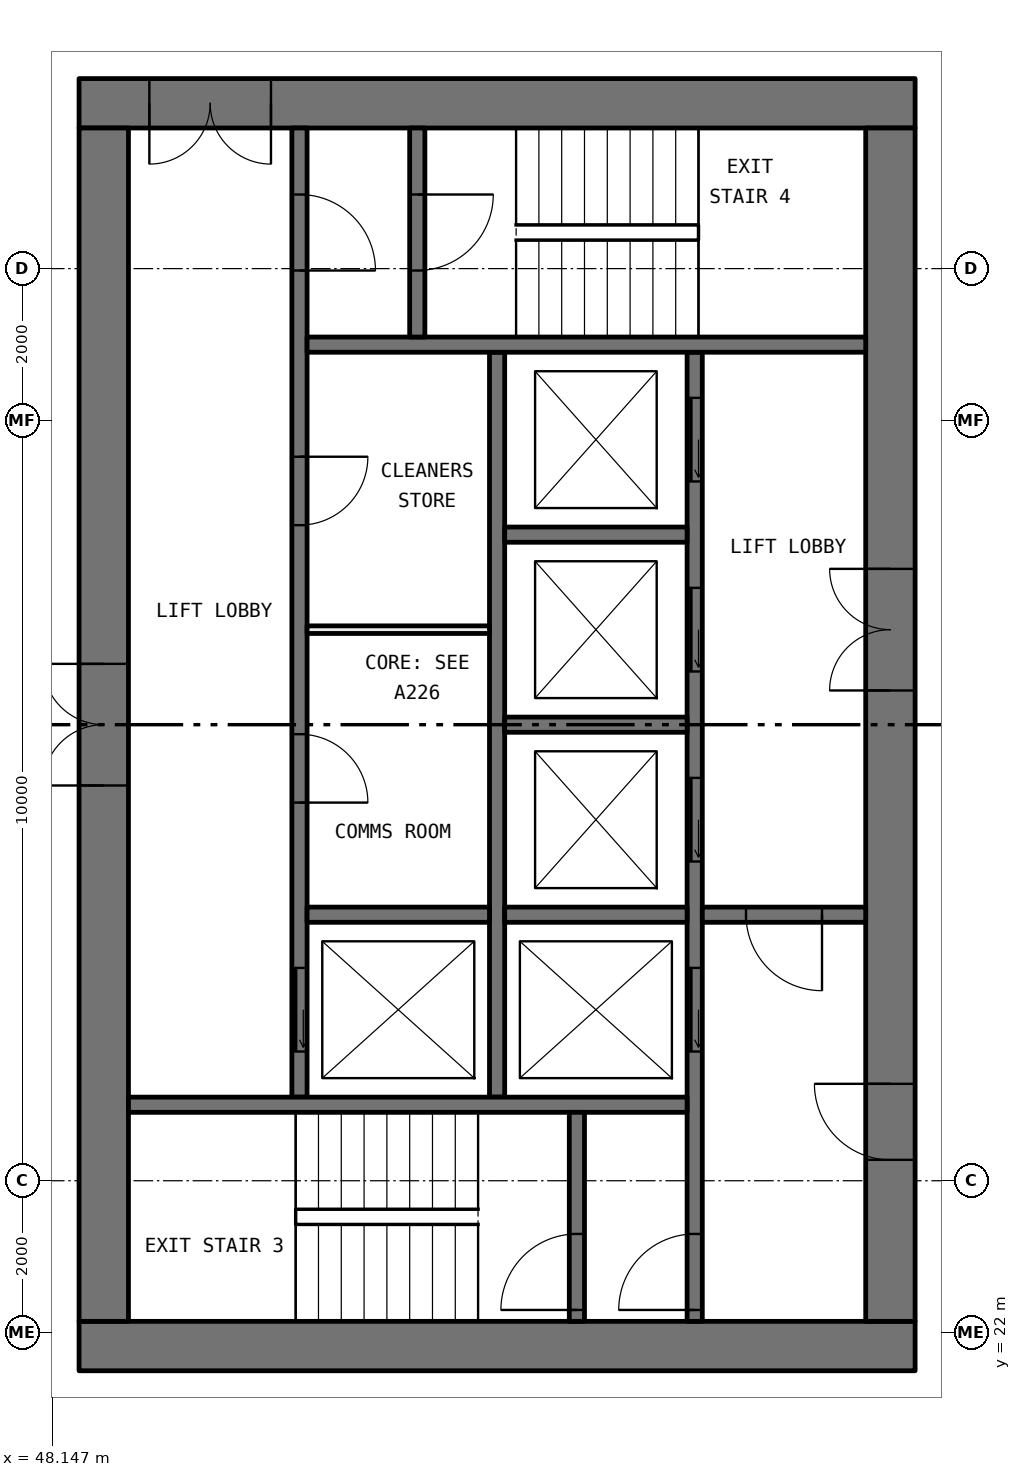
"""IFC4 building model, lengths in metres.
Left out: names, types, materials, properties, quantities, classifications, styles, units other than length and angle.
Written with IfcOpenShell. Run it as: python <this file> out.ifc"""

import sys

from ifc_helpers import new_model, si_unit, direction, frame, frame_2d, origin, place, context, subcontext, project, spatial, rectangle, extrude, element, fill, save


model = new_model("IFC4")
c1 = context("Model", 3, precision=1e-05, world=origin(), true_north=direction((0.0, 1.0)))
c2 = subcontext(c1, "Body", "Model", "MODEL_VIEW")
j1 = project(units=[si_unit("LENGTHUNIT", "METRE"), si_unit("PLANEANGLEUNIT", "RADIAN")], contexts=[c1])
p1 = place(None, origin())
s1 = spatial("IfcSite", under=j1, at=p1, CompositionType="ELEMENT")
p2 = place(p1, origin())
s2 = spatial("IfcBuilding", under=s1, at=p2, CompositionType="ELEMENT")
p3 = place(p2, frame((0.0, 0.0, 100.05)))
s3 = spatial("IfcBuildingStorey", under=s2, at=p3, CompositionType="ELEMENT", Elevation=100.05)
p4 = place(p3, frame((59.5, 21.825, 0.0), z_axis=(0.0, 0.0, 1.0), x_axis=(-1.0, 0.0, 0.0)))
e1 = element("IfcWall", 1, at=p4, inside=s3, PredefinedType="SHEAR", context=c2, shape_type="SweptSolid", body=[
    extrude(rectangle(XDim=11.0, YDim=0.65, at=frame_2d((5.5, 0.0))), origin(), (0.0, 0.0, 1.0), 3.05),
])
p5 = place(p3, frame((59.5, 38.175, 0.0), z_axis=(0.0, 0.0, 1.0), x_axis=(-1.0, 0.0, 0.0)))
e2 = element("IfcWall", 2, at=p5, inside=s3, PredefinedType="SHEAR", context=c2, shape_type="SweptSolid", body=[
    extrude(rectangle(XDim=11.0, YDim=0.65, at=frame_2d((5.5, 0.0))), origin(), (0.0, 0.0, 1.0), 3.05),
])
p6 = place(p5, frame((8.475, 0.0, 0.0)))
e3 = element("IfcOpeningElement", 3, at=p6, cuts=e2, PredefinedType="OPENING", context=c2, shape_type="SweptSolid", body=[
    extrude(rectangle(XDim=1.6, YDim=2.1, at=frame_2d((0.8, 1.05))), frame((0.0, 0.335, 0.0), z_axis=(0.0, -1.0, 0.0), x_axis=(1.0, 0.0, 0.0)), (0.0, 0.0, 1.0), 0.67),
])
p7 = place(p3, frame((59.175, 22.15, 0.0), z_axis=(0.0, 0.0, 1.0), x_axis=(0.0, 1.0, 0.0)))
e4 = element("IfcWall", 4, at=p7, inside=s3, PredefinedType="SHEAR", context=c2, shape_type="SweptSolid", body=[
    extrude(rectangle(XDim=15.7, YDim=0.65, at=frame_2d((7.85, 0.0))), origin(), (0.0, 0.0, 1.0), 3.05),
])
p8 = place(p7, frame((8.3, 0.0, 0.0)))
e5 = element("IfcOpeningElement", 5, at=p8, cuts=e4, PredefinedType="OPENING", context=c2, shape_type="SweptSolid", body=[
    extrude(rectangle(XDim=1.6, YDim=2.1, at=frame_2d((0.8, 1.05))), frame((0.0, 0.335, 0.0), z_axis=(0.0, -1.0, 0.0), x_axis=(1.0, 0.0, 0.0)), (0.0, 0.0, 1.0), 0.67),
])
p9 = place(p7, frame((2.125, 0.0, 0.0)))
e6 = element("IfcOpeningElement", 6, at=p9, cuts=e4, PredefinedType="OPENING", context=c2, shape_type="SweptSolid", body=[
    extrude(rectangle(XDim=1.0, YDim=2.1, at=frame_2d((0.5, 1.05))), frame((0.0, 0.335, 0.0), z_axis=(0.0, -1.0, 0.0), x_axis=(1.0, 0.0, 0.0)), (0.0, 0.0, 1.0), 0.67),
])
p10 = place(p3, frame((48.825, 22.15, 0.0), z_axis=(0.0, 0.0, 1.0), x_axis=(0.0, 1.0, 0.0)))
e7 = element("IfcWall", 7, at=p10, inside=s3, PredefinedType="SHEAR", context=c2, shape_type="SweptSolid", body=[
    extrude(rectangle(XDim=15.7, YDim=0.65, at=frame_2d((7.85, 0.0))), origin(), (0.0, 0.0, 1.0), 3.05),
])
p11 = place(p10, frame((7.05, 0.0, 0.0)))
e8 = element("IfcOpeningElement", 8, at=p11, cuts=e7, PredefinedType="OPENING", context=c2, shape_type="SweptSolid", body=[
    extrude(rectangle(XDim=1.6, YDim=2.1, at=frame_2d((0.8, 1.05))), frame((0.0, 0.335, 0.0), z_axis=(0.0, -1.0, 0.0), x_axis=(1.0, 0.0, 0.0)), (0.0, 0.0, 1.0), 0.67),
])
p12 = place(p3, frame((56.6, 22.15, 0.0), z_axis=(0.0, 0.0, 1.0), x_axis=(0.0, 1.0, 0.0)))
e9 = element("IfcWall", 9, at=p12, inside=s3, PredefinedType="SOLIDWALL", context=c2, shape_type="SweptSolid", body=[
    extrude(rectangle(XDim=12.75, YDim=0.2, at=frame_2d((6.375, 0.0))), origin(), (0.0, 0.0, 1.0), 3.05),
])
p13 = place(p12, frame((3.55, 0.0, 0.0)))
e10 = element("IfcOpeningElement", 10, at=p13, cuts=e9, PredefinedType="OPENING", context=c2, shape_type="SweptSolid", body=[
    extrude(rectangle(XDim=1.1, YDim=2.1, at=frame_2d((0.55, 1.05))), frame((0.0, 0.11, 0.0), z_axis=(0.0, -1.0, 0.0), x_axis=(1.0, 0.0, 0.0)), (0.0, 0.0, 1.0), 0.22),
])
p14 = place(p12, frame((6.05, 0.0, 0.0)))
e11 = element("IfcOpeningElement", 11, at=p14, cuts=e9, PredefinedType="OPENING", context=c2, shape_type="SweptSolid", body=[
    extrude(rectangle(XDim=1.1, YDim=2.1, at=frame_2d((0.55, 1.05))), frame((0.0, 0.11, 0.0), z_axis=(0.0, -1.0, 0.0), x_axis=(1.0, 0.0, 0.0)), (0.0, 0.0, 1.0), 0.22),
])
p15 = place(p12, frame((8.55, 0.0, 0.0)))
e12 = element("IfcOpeningElement", 12, at=p15, cuts=e9, PredefinedType="OPENING", context=c2, shape_type="SweptSolid", body=[
    extrude(rectangle(XDim=1.1, YDim=2.1, at=frame_2d((0.55, 1.05))), frame((0.0, 0.11, 0.0), z_axis=(0.0, -1.0, 0.0), x_axis=(1.0, 0.0, 0.0)), (0.0, 0.0, 1.0), 0.22),
])
p16 = place(p12, frame((11.05, 0.0, 0.0)))
e13 = element("IfcOpeningElement", 13, at=p16, cuts=e9, PredefinedType="OPENING", context=c2, shape_type="SweptSolid", body=[
    extrude(rectangle(XDim=1.1, YDim=2.1, at=frame_2d((0.55, 1.05))), frame((0.0, 0.11, 0.0), z_axis=(0.0, -1.0, 0.0), x_axis=(1.0, 0.0, 0.0)), (0.0, 0.0, 1.0), 0.22),
])
p17 = place(p12, frame((0.15, 0.0, 0.0)))
e14 = element("IfcOpeningElement", 14, at=p17, cuts=e9, PredefinedType="OPENING", context=c2, shape_type="SweptSolid", body=[
    extrude(rectangle(XDim=1.0, YDim=2.1, at=frame_2d((0.5, 1.05))), frame((0.0, 0.11, 0.0), z_axis=(0.0, -1.0, 0.0), x_axis=(1.0, 0.0, 0.0)), (0.0, 0.0, 1.0), 0.22),
])
p18 = place(p3, frame((51.4, 25.1, 0.0), z_axis=(0.0, 0.0, 1.0), x_axis=(0.0, 1.0, 0.0)))
e15 = element("IfcWall", 15, at=p18, inside=s3, PredefinedType="SOLIDWALL", context=c2, shape_type="SweptSolid", body=[
    extrude(rectangle(XDim=12.75, YDim=0.2, at=frame_2d((6.375, 0.0))), origin(), (0.0, 0.0, 1.0), 3.05),
])
p19 = place(p18, frame((0.6, 0.0, 0.0)))
e16 = element("IfcOpeningElement", 16, at=p19, cuts=e15, PredefinedType="OPENING", context=c2, shape_type="SweptSolid", body=[
    extrude(rectangle(XDim=1.1, YDim=2.1, at=frame_2d((0.55, 1.05))), frame((0.0, 0.11, 0.0), z_axis=(0.0, -1.0, 0.0), x_axis=(1.0, 0.0, 0.0)), (0.0, 0.0, 1.0), 0.22),
])
p20 = place(p18, frame((10.875, 0.0, 0.0)))
e17 = element("IfcOpeningElement", 17, at=p20, cuts=e15, PredefinedType="OPENING", context=c2, shape_type="SweptSolid", body=[
    extrude(rectangle(XDim=1.0, YDim=2.1, at=frame_2d((0.5, 1.05))), frame((0.0, 0.11, 0.0), z_axis=(0.0, -1.0, 0.0), x_axis=(1.0, 0.0, 0.0)), (0.0, 0.0, 1.0), 0.22),
])
p21 = place(p18, frame((3.875, 0.0, 0.0)))
e18 = element("IfcOpeningElement", 18, at=p21, cuts=e15, PredefinedType="OPENING", context=c2, shape_type="SweptSolid", body=[
    extrude(rectangle(XDim=0.9, YDim=2.1, at=frame_2d((0.45, 1.05))), frame((0.0, 0.11, 0.0), z_axis=(0.0, -1.0, 0.0), x_axis=(1.0, 0.0, 0.0)), (0.0, 0.0, 1.0), 0.22),
])
p22 = place(p18, frame((7.525, 0.0, 0.0)))
e19 = element("IfcOpeningElement", 19, at=p22, cuts=e15, PredefinedType="OPENING", context=c2, shape_type="SweptSolid", body=[
    extrude(rectangle(XDim=0.9, YDim=2.1, at=frame_2d((0.45, 1.05))), frame((0.0, 0.11, 0.0), z_axis=(0.0, -1.0, 0.0), x_axis=(1.0, 0.0, 0.0)), (0.0, 0.0, 1.0), 0.22),
])
p23 = place(p3, frame((54.0, 25.1, 0.0), z_axis=(0.0, 0.0, 1.0), x_axis=(0.0, 1.0, 0.0)))
e20 = element("IfcWall", 20, at=p23, inside=s3, PredefinedType="SOLIDWALL", context=c2, shape_type="SweptSolid", body=[
    extrude(rectangle(XDim=9.8, YDim=0.2, at=frame_2d((4.9, 0.0))), origin(), (0.0, 0.0, 1.0), 3.05),
])
for number, where, z_axis, x_axis in (
    (21, (56.5, 25.0, 0.0), (0.0, 0.0, 1.0), (-1.0, 0.0, 0.0)),
    (22, (58.85, 35.0, 0.0), (0.0, 0.0, 1.0), (-1.0, 0.0, 0.0)),
):
    element("IfcWall", number, at=place(p3, frame(where, z_axis=z_axis, x_axis=x_axis)), inside=s3, PredefinedType="SOLIDWALL", context=c2, shape_type="SweptSolid", body=[
        extrude(rectangle(XDim=7.35, YDim=0.2, at=frame_2d((3.675, 0.0))), origin(), (0.0, 0.0, 1.0), 3.05),
    ])
p24 = place(p3, frame((58.85, 27.5, 0.0), z_axis=(0.0, 0.0, 1.0), x_axis=(-1.0, 0.0, 0.0)))
e23 = element("IfcWall", 23, at=p24, inside=s3, PredefinedType="SOLIDWALL", context=c2, shape_type="SweptSolid", body=[
    extrude(rectangle(XDim=2.15, YDim=0.2, at=frame_2d((1.075, 0.0))), origin(), (0.0, 0.0, 1.0), 3.05),
])
p25 = place(p24, frame((0.575, 0.0, 0.0)))
e24 = element("IfcOpeningElement", 24, at=p25, cuts=e23, PredefinedType="OPENING", context=c2, shape_type="SweptSolid", body=[
    extrude(rectangle(XDim=1.0, YDim=2.1, at=frame_2d((0.5, 1.05))), frame((0.0, 0.11, 0.0), z_axis=(0.0, -1.0, 0.0), x_axis=(1.0, 0.0, 0.0)), (0.0, 0.0, 1.0), 0.22),
])
p26 = place(p3, frame((55.05, 22.15, 0.0), z_axis=(0.0, 0.0, 1.0), x_axis=(0.0, 1.0, 0.0)))
e25 = element("IfcWall", 25, at=p26, inside=s3, PredefinedType="SOLIDWALL", context=c2, shape_type="SweptSolid", body=[
    extrude(rectangle(XDim=2.75, YDim=0.2, at=frame_2d((1.375, 0.0))), origin(), (0.0, 0.0, 1.0), 3.05),
])
p27 = place(p26, frame((0.15, 0.0, 0.0)))
e26 = element("IfcOpeningElement", 26, at=p27, cuts=e25, PredefinedType="OPENING", context=c2, shape_type="SweptSolid", body=[
    extrude(rectangle(XDim=1.0, YDim=2.1, at=frame_2d((0.5, 1.05))), frame((0.0, 0.11, 0.0), z_axis=(0.0, -1.0, 0.0), x_axis=(1.0, 0.0, 0.0)), (0.0, 0.0, 1.0), 0.22),
])
p28 = place(p3, frame((52.95, 35.1, 0.0), z_axis=(0.0, 0.0, 1.0), x_axis=(0.0, 1.0, 0.0)))
e27 = element("IfcWall", 27, at=p28, inside=s3, PredefinedType="SOLIDWALL", context=c2, shape_type="SweptSolid", body=[
    extrude(rectangle(XDim=2.75, YDim=0.2, at=frame_2d((1.375, 0.0))), origin(), (0.0, 0.0, 1.0), 3.05),
])
p29 = place(p28, frame((0.875, 0.0, 0.0)))
e28 = element("IfcOpeningElement", 28, at=p29, cuts=e27, PredefinedType="OPENING", context=c2, shape_type="SweptSolid", body=[
    extrude(rectangle(XDim=1.0, YDim=2.1, at=frame_2d((0.5, 1.05))), frame((0.0, 0.11, 0.0), z_axis=(0.0, -1.0, 0.0), x_axis=(1.0, 0.0, 0.0)), (0.0, 0.0, 1.0), 0.22),
])
for number, where, z_axis, x_axis in (
    (29, (56.5, 27.5, 0.0), (0.0, 0.0, 1.0), (-1.0, 0.0, 0.0)),
    (30, (56.5, 30.0, 0.0), (0.0, 0.0, 1.0), (-1.0, 0.0, 0.0)),
    (31, (56.5, 32.5, 0.0), (0.0, 0.0, 1.0), (-1.0, 0.0, 0.0)),
    (32, (53.9, 27.5, 0.0), (0.0, 0.0, 1.0), (-1.0, 0.0, 0.0)),
):
    element("IfcWall", number, at=place(p3, frame(where, z_axis=z_axis, x_axis=x_axis)), inside=s3, PredefinedType="SOLIDWALL", context=c2, shape_type="SweptSolid", body=[
        extrude(rectangle(XDim=2.4, YDim=0.2, at=frame_2d((1.2, 0.0))), origin(), (0.0, 0.0, 1.0), 3.05),
    ])
p30 = place(p3, frame((53.9, 31.25, 0.0), z_axis=(0.0, 0.0, 1.0), x_axis=(-1.0, 0.0, 0.0)))
e33 = element("IfcWall", 33, at=p30, inside=s3, PredefinedType="PARTITIONING", context=c2, shape_type="SweptSolid", body=[
    extrude(rectangle(XDim=2.4, YDim=0.1, at=frame_2d((1.2, 0.0))), origin(), (0.0, 0.0, 1.0), 3.05),
])
p31 = place(p19, origin())
e34 = element("IfcDoor", 34, at=p31, inside=s3, OperationType="SLIDING_TO_LEFT", PredefinedType="DOOR", context=c2, shape_type="SweptSolid", body=[
    extrude(rectangle(XDim=1.1, YDim=2.1, at=frame_2d((0.55, 1.05))), frame((0.0, 0.025, 0.0), z_axis=(0.0, -1.0, 0.0), x_axis=(1.0, 0.0, 0.0)), (0.0, 0.0, 1.0), 0.05),
])
fill(e16, e34)
p32 = place(p13, origin())
e35 = element("IfcDoor", 35, at=p32, inside=s3, OperationType="SLIDING_TO_LEFT", PredefinedType="DOOR", context=c2, shape_type="SweptSolid", body=[
    extrude(rectangle(XDim=1.1, YDim=2.1, at=frame_2d((0.55, 1.05))), frame((0.0, 0.025, 0.0), z_axis=(0.0, -1.0, 0.0), x_axis=(1.0, 0.0, 0.0)), (0.0, 0.0, 1.0), 0.05),
])
fill(e10, e35)
p33 = place(p14, origin())
e36 = element("IfcDoor", 36, at=p33, inside=s3, OperationType="SLIDING_TO_LEFT", PredefinedType="DOOR", context=c2, shape_type="SweptSolid", body=[
    extrude(rectangle(XDim=1.1, YDim=2.1, at=frame_2d((0.55, 1.05))), frame((0.0, 0.025, 0.0), z_axis=(0.0, -1.0, 0.0), x_axis=(1.0, 0.0, 0.0)), (0.0, 0.0, 1.0), 0.05),
])
fill(e11, e36)
p34 = place(p15, origin())
e37 = element("IfcDoor", 37, at=p34, inside=s3, OperationType="SLIDING_TO_LEFT", PredefinedType="DOOR", context=c2, shape_type="SweptSolid", body=[
    extrude(rectangle(XDim=1.1, YDim=2.1, at=frame_2d((0.55, 1.05))), frame((0.0, 0.025, 0.0), z_axis=(0.0, -1.0, 0.0), x_axis=(1.0, 0.0, 0.0)), (0.0, 0.0, 1.0), 0.05),
])
fill(e12, e37)
p35 = place(p16, origin())
e38 = element("IfcDoor", 38, at=p35, inside=s3, OperationType="SLIDING_TO_LEFT", PredefinedType="DOOR", context=c2, shape_type="SweptSolid", body=[
    extrude(rectangle(XDim=1.1, YDim=2.1, at=frame_2d((0.55, 1.05))), frame((0.0, 0.025, 0.0), z_axis=(0.0, -1.0, 0.0), x_axis=(1.0, 0.0, 0.0)), (0.0, 0.0, 1.0), 0.05),
])
fill(e13, e38)
p36 = place(p27, origin())
e39 = element("IfcDoor", 39, at=p36, inside=s3, OperationType="SINGLE_SWING_RIGHT", PredefinedType="DOOR", context=c2, shape_type="SweptSolid", body=[
    extrude(rectangle(XDim=1.0, YDim=2.1, at=frame_2d((0.5, 1.05))), frame((0.0, 0.025, 0.0), z_axis=(0.0, -1.0, 0.0), x_axis=(1.0, 0.0, 0.0)), (0.0, 0.0, 1.0), 0.05),
])
fill(e26, e39)
p37 = place(p17, origin())
e40 = element("IfcDoor", 40, at=p37, inside=s3, OperationType="SINGLE_SWING_RIGHT", PredefinedType="DOOR", context=c2, shape_type="SweptSolid", body=[
    extrude(rectangle(XDim=1.0, YDim=2.1, at=frame_2d((0.5, 1.05))), frame((0.0, 0.025, 0.0), z_axis=(0.0, -1.0, 0.0), x_axis=(1.0, 0.0, 0.0)), (0.0, 0.0, 1.0), 0.05),
])
fill(e14, e40)
p38 = place(p20, frame((1.0, 0.0, 0.0), x_axis=(-1.0, 0.0, 0.0)))
e41 = element("IfcDoor", 41, at=p38, inside=s3, OperationType="SINGLE_SWING_LEFT", PredefinedType="DOOR", context=c2, shape_type="SweptSolid", body=[
    extrude(rectangle(XDim=1.0, YDim=2.1, at=frame_2d((0.5, 1.05))), frame((0.0, 0.025, 0.0), z_axis=(0.0, -1.0, 0.0), x_axis=(1.0, 0.0, 0.0)), (0.0, 0.0, 1.0), 0.05),
])
fill(e17, e41)
p39 = place(p29, frame((1.0, 0.0, 0.0), x_axis=(-1.0, 0.0, 0.0)))
e42 = element("IfcDoor", 42, at=p39, inside=s3, OperationType="SINGLE_SWING_RIGHT", PredefinedType="DOOR", context=c2, shape_type="SweptSolid", body=[
    extrude(rectangle(XDim=1.0, YDim=2.1, at=frame_2d((0.5, 1.05))), frame((0.0, 0.025, 0.0), z_axis=(0.0, -1.0, 0.0), x_axis=(1.0, 0.0, 0.0)), (0.0, 0.0, 1.0), 0.05),
])
fill(e28, e42)
p40 = place(p25, origin())
e43 = element("IfcDoor", 43, at=p40, inside=s3, OperationType="SINGLE_SWING_RIGHT", PredefinedType="DOOR", context=c2, shape_type="SweptSolid", body=[
    extrude(rectangle(XDim=1.0, YDim=2.1, at=frame_2d((0.5, 1.05))), frame((0.0, 0.025, 0.0), z_axis=(0.0, -1.0, 0.0), x_axis=(1.0, 0.0, 0.0)), (0.0, 0.0, 1.0), 0.05),
])
fill(e24, e43)
p41 = place(p8, origin())
e44 = element("IfcDoor", 44, at=p41, inside=s3, OperationType="DOUBLE_DOOR_SINGLE_SWING", PredefinedType="DOOR", context=c2, shape_type="SweptSolid", body=[
    extrude(rectangle(XDim=1.6, YDim=2.1, at=frame_2d((0.8, 1.05))), frame((0.0, 0.025, 0.0), z_axis=(0.0, -1.0, 0.0), x_axis=(1.0, 0.0, 0.0)), (0.0, 0.0, 1.0), 0.05),
])
fill(e5, e44)
p42 = place(p9, origin())
e45 = element("IfcDoor", 45, at=p42, inside=s3, OperationType="SINGLE_SWING_LEFT", PredefinedType="DOOR", context=c2, shape_type="SweptSolid", body=[
    extrude(rectangle(XDim=1.0, YDim=2.1, at=frame_2d((0.5, 1.05))), frame((0.0, 0.025, 0.0), z_axis=(0.0, -1.0, 0.0), x_axis=(1.0, 0.0, 0.0)), (0.0, 0.0, 1.0), 0.05),
])
fill(e6, e45)
p43 = place(p6, origin())
e46 = element("IfcDoor", 46, at=p43, inside=s3, OperationType="DOUBLE_DOOR_SINGLE_SWING", PredefinedType="DOOR", context=c2, shape_type="SweptSolid", body=[
    extrude(rectangle(XDim=1.6, YDim=2.1, at=frame_2d((0.8, 1.05))), frame((0.0, 0.025, 0.0), z_axis=(0.0, -1.0, 0.0), x_axis=(1.0, 0.0, 0.0)), (0.0, 0.0, 1.0), 0.05),
])
fill(e3, e46)
p44 = place(p11, origin())
e47 = element("IfcDoor", 47, at=p44, inside=s3, OperationType="DOUBLE_DOOR_SINGLE_SWING", PredefinedType="DOOR", context=c2, shape_type="SweptSolid", body=[
    extrude(rectangle(XDim=1.6, YDim=2.1, at=frame_2d((0.8, 1.05))), frame((0.0, 0.025, 0.0), z_axis=(0.0, -1.0, 0.0), x_axis=(1.0, 0.0, 0.0)), (0.0, 0.0, 1.0), 0.05),
])
fill(e8, e47)
p45 = place(p21, frame((0.9, 0.0, 0.0), x_axis=(-1.0, 0.0, 0.0)))
e48 = element("IfcDoor", 48, at=p45, inside=s3, OperationType="SINGLE_SWING_LEFT", PredefinedType="DOOR", context=c2, shape_type="SweptSolid", body=[
    extrude(rectangle(XDim=0.9, YDim=2.1, at=frame_2d((0.45, 1.05))), frame((0.0, 0.025, 0.0), z_axis=(0.0, -1.0, 0.0), x_axis=(1.0, 0.0, 0.0)), (0.0, 0.0, 1.0), 0.05),
])
fill(e18, e48)
p46 = place(p22, frame((0.9, 0.0, 0.0), x_axis=(-1.0, 0.0, 0.0)))
e49 = element("IfcDoor", 49, at=p46, inside=s3, OperationType="SINGLE_SWING_RIGHT", PredefinedType="DOOR", context=c2, shape_type="SweptSolid", body=[
    extrude(rectangle(XDim=0.9, YDim=2.1, at=frame_2d((0.45, 1.05))), frame((0.0, 0.025, 0.0), z_axis=(0.0, -1.0, 0.0), x_axis=(1.0, 0.0, 0.0)), (0.0, 0.0, 1.0), 0.05),
])
fill(e19, e49)
save(model, sys.argv[1])
